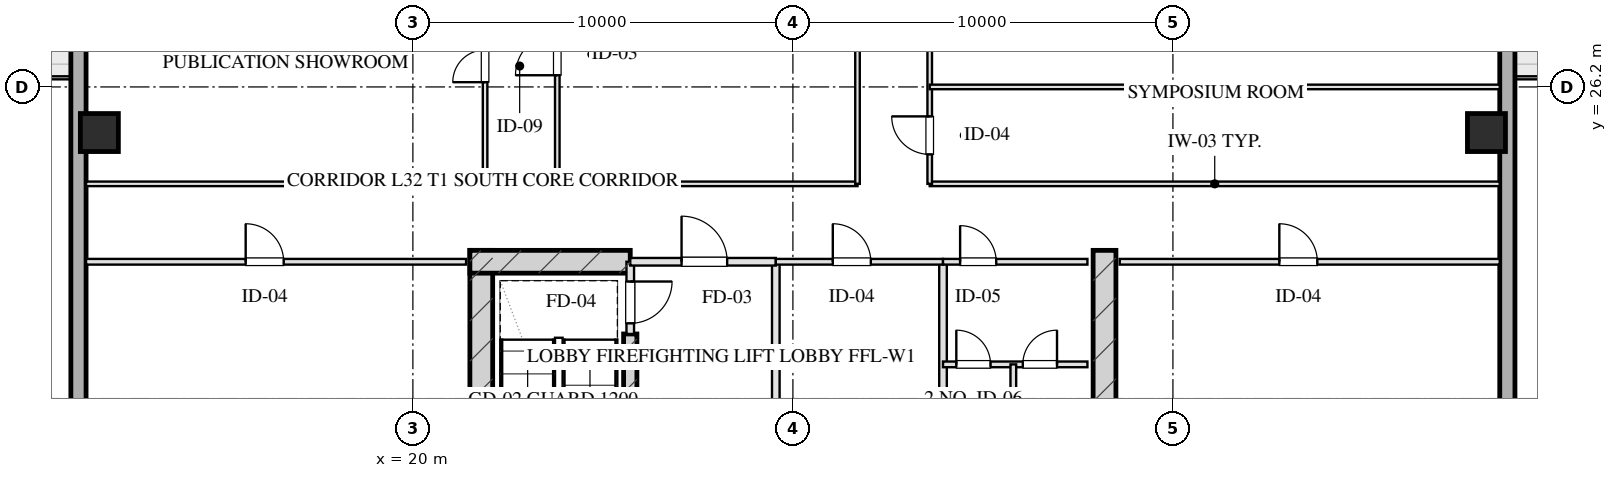
"""IFC4 building model, lengths in metres.
Left out: names, types, materials, properties, quantities, classifications, styles, units other than length and angle.
Written with IfcOpenShell. Run it as: python <this file> out.ifc"""

import sys

from ifc_helpers import new_model, si_unit, direction, frame, frame_2d, origin, origin_2d, place, context, subcontext, project, spatial, rectangle, hollow_rectangle, extrude, element, fill, save


model = new_model("IFC4")
c1 = context("Model", 3, precision=1e-05, world=origin(), true_north=direction((0.0, 1.0)))
c2 = subcontext(c1, "Body", "Model", "MODEL_VIEW")
j1 = project(units=[si_unit("LENGTHUNIT", "METRE"), si_unit("PLANEANGLEUNIT", "RADIAN")], contexts=[c1])
p1 = place(None, origin())
s1 = spatial("IfcSite", under=j1, at=p1, CompositionType="ELEMENT")
p2 = place(p1, origin())
s2 = spatial("IfcBuilding", under=s1, at=p2, CompositionType="ELEMENT")
p3 = place(p2, frame((0.0, 0.0, 124.2)))
s3 = spatial("IfcBuildingStorey", under=s2, at=p3, CompositionType="ELEMENT", Elevation=124.2)
for number, where, z_axis, x_axis in (
    (1, (21.8, 21.9, 0.0), (0.0, 0.0, 1.0), (0.0, -1.0, 0.0)),
    (2, (38.2, 21.9, 0.0), (0.0, 0.0, 1.0), (0.0, -1.0, 0.0)),
):
    element("IfcWall", number, at=place(p3, frame(where, z_axis=z_axis, x_axis=x_axis)), inside=s3, PredefinedType="SHEAR", context=c2, shape_type="SweptSolid", body=[
        extrude(rectangle(XDim=9.48, YDim=0.6, at=frame_2d((4.74, 0.0))), origin(), (0.0, 0.0, 1.0), 3.45),
    ])
p4 = place(p3, frame((25.72, 19.7, 0.0), z_axis=(0.0, 0.0, 1.0), x_axis=(0.0, -1.0, 0.0)))
e3 = element("IfcWall", 3, at=p4, inside=s3, PredefinedType="SHEAR", context=c2, shape_type="SweptSolid", body=[
    extrude(rectangle(XDim=6.98, YDim=0.35, at=frame_2d((3.49, 0.0))), origin(), (0.0, 0.0, 1.0), 3.45),
])
p5 = place(p3, frame((21.5, 21.6, 0.0), z_axis=(0.0, 0.0, 1.0), x_axis=(1.0, 0.0, 0.0)))
e4 = element("IfcWall", 4, at=p5, inside=s3, PredefinedType="SHEAR", context=c2, shape_type="SweptSolid", body=[
    extrude(rectangle(XDim=4.22, YDim=0.6, at=frame_2d((2.11, 0.0))), origin(), (0.0, 0.0, 1.0), 3.45),
])
for number, where, z_axis, x_axis in (
    (5, (11.75, 25.0, 0.0), (0.0, 0.0, 1.0), (1.0, 0.0, 0.0)),
    (6, (48.25, 25.0, 0.0), (0.0, 0.0, 1.0), (1.0, 0.0, 0.0)),
):
    element("IfcColumn", number, at=place(p3, frame(where, z_axis=z_axis, x_axis=x_axis)), inside=s3, PredefinedType="COLUMN", context=c2, shape_type="SweptSolid", body=[
        extrude(hollow_rectangle(XDim=1.0, YDim=1.0, WallThickness=0.036, at=origin_2d()), origin(), (0.0, 0.0, 1.0), 3.451),
    ])
p6 = place(p3, frame((11.2, 9.0, 0.0), z_axis=(0.0, 0.0, 1.0), x_axis=(0.0, 1.0, 0.0)))
e7 = element("IfcWall", 7, at=p6, inside=s3, PredefinedType="SOLIDWALL", context=c2, shape_type="SweptSolid", body=[
    extrude(rectangle(XDim=50.0, YDim=0.4, at=frame_2d((25.0, 0.0))), origin(), (0.0, 0.0, 1.0), 2.61),
])
p7 = place(p6, frame((30.2, 0.0, 0.75)))
e8 = element("IfcOpeningElement", 8, at=p7, cuts=e7, PredefinedType="OPENING", context=c2, shape_type="SweptSolid", body=[
    extrude(rectangle(XDim=2.4, YDim=1.46, at=frame_2d((1.2, 0.73))), frame((0.0, 0.21, 0.0), z_axis=(0.0, -1.0, 0.0), x_axis=(1.0, 0.0, 0.0)), (0.0, 0.0, 1.0), 0.42),
])
p8 = place(p6, frame((18.65, 0.0, 0.0)))
e9 = element("IfcOpeningElement", 9, at=p8, cuts=e7, PredefinedType="OPENING", context=c2, shape_type="SweptSolid", body=[
    extrude(rectangle(XDim=1.1, YDim=2.15, at=frame_2d((0.55, 1.075))), frame((0.0, 0.21, 0.0), z_axis=(0.0, -1.0, 0.0), x_axis=(1.0, 0.0, 0.0)), (0.0, 0.0, 1.0), 0.42),
])
p9 = place(p3, frame((48.8, 59.0, 0.0), z_axis=(0.0, 0.0, 1.0), x_axis=(0.0, -1.0, 0.0)))
e10 = element("IfcWall", 10, at=p9, inside=s3, PredefinedType="SOLIDWALL", context=c2, shape_type="SweptSolid", body=[
    extrude(rectangle(XDim=50.0, YDim=0.4, at=frame_2d((25.0, 0.0))), origin(), (0.0, 0.0, 1.0), 2.61),
])
p10 = place(p9, frame((21.2, 0.0, 0.75)))
e11 = element("IfcOpeningElement", 11, at=p10, cuts=e10, PredefinedType="OPENING", context=c2, shape_type="SweptSolid", body=[
    extrude(rectangle(XDim=2.4, YDim=1.46, at=frame_2d((1.2, 0.73))), frame((0.0, 0.21, 0.0), z_axis=(0.0, -1.0, 0.0), x_axis=(1.0, 0.0, 0.0)), (0.0, 0.0, 1.0), 0.42),
])
p11 = place(p9, frame((30.25, 0.0, 0.0)))
e12 = element("IfcOpeningElement", 12, at=p11, cuts=e10, PredefinedType="OPENING", context=c2, shape_type="SweptSolid", body=[
    extrude(rectangle(XDim=1.1, YDim=2.15, at=frame_2d((0.55, 1.075))), frame((0.0, 0.21, 0.0), z_axis=(0.0, -1.0, 0.0), x_axis=(1.0, 0.0, 0.0)), (0.0, 0.0, 1.0), 0.42),
])
p12 = place(p3, frame((25.72, 21.6, 0.0), z_axis=(0.0, 0.0, 1.0), x_axis=(0.0, -1.0, 0.0)))
e13 = element("IfcWall", 13, at=p12, inside=s3, PredefinedType="PARTITIONING", context=c2, shape_type="SweptSolid", body=[
    extrude(rectangle(XDim=1.9, YDim=0.2, at=frame_2d((0.95, 0.0))), origin(), (0.0, 0.0, 1.0), 3.175),
])
p13 = place(p12, frame((0.52, 0.0, 0.0)))
e14 = element("IfcOpeningElement", 14, at=p13, cuts=e13, PredefinedType="OPENING", context=c2, shape_type="SweptSolid", body=[
    extrude(rectangle(XDim=1.1, YDim=2.05, at=frame_2d((0.55, 1.025))), frame((0.0, 0.11, 0.0), z_axis=(0.0, -1.0, 0.0), x_axis=(1.0, 0.0, 0.0)), (0.0, 0.0, 1.0), 0.22),
])
p14 = place(p3, frame((29.55, 21.6, 0.0), z_axis=(0.0, 0.0, 1.0), x_axis=(0.0, -1.0, 0.0)))
e15 = element("IfcWall", 15, at=p14, inside=s3, PredefinedType="PARTITIONING", context=c2, shape_type="SweptSolid", body=[
    extrude(rectangle(XDim=8.43, YDim=0.2, at=frame_2d((4.215, 0.0))), origin(), (0.0, 0.0, 1.0), 3.175),
])
p15 = place(p3, frame((25.72, 21.6, 0.0), z_axis=(0.0, 0.0, 1.0), x_axis=(1.0, 0.0, 0.0)))
e16 = element("IfcWall", 16, at=p15, inside=s3, PredefinedType="PARTITIONING", context=c2, shape_type="SweptSolid", body=[
    extrude(rectangle(XDim=3.83, YDim=0.2, at=frame_2d((1.915, 0.0))), origin(), (0.0, 0.0, 1.0), 3.175),
])
p16 = place(p15, frame((1.35, 0.0, 0.0)))
e17 = element("IfcOpeningElement", 17, at=p16, cuts=e16, PredefinedType="OPENING", context=c2, shape_type="SweptSolid", body=[
    extrude(rectangle(XDim=1.2, YDim=2.05, at=frame_2d((0.6, 1.025))), frame((0.0, 0.11, 0.0), z_axis=(0.0, -1.0, 0.0), x_axis=(1.0, 0.0, 0.0)), (0.0, 0.0, 1.0), 0.22),
])
p17 = place(p3, frame((33.95, 21.6, 0.0), z_axis=(0.0, 0.0, 1.0), x_axis=(0.0, -1.0, 0.0)))
e18 = element("IfcWall", 18, at=p17, inside=s3, PredefinedType="PARTITIONING", context=c2, shape_type="SweptSolid", body=[
    extrude(rectangle(XDim=8.43, YDim=0.2, at=frame_2d((4.215, 0.0))), origin(), (0.0, 0.0, 1.0), 3.175),
])
p18 = place(p3, frame((29.55, 21.6, 0.0), z_axis=(0.0, 0.0, 1.0), x_axis=(1.0, 0.0, 0.0)))
e19 = element("IfcWall", 19, at=p18, inside=s3, PredefinedType="PARTITIONING", context=c2, shape_type="SweptSolid", body=[
    extrude(rectangle(XDim=4.4, YDim=0.15, at=frame_2d((2.2, 0.0))), origin(), (0.0, 0.0, 1.0), 3.175),
])
p19 = place(p18, frame((1.5, 0.0, 0.0)))
e20 = element("IfcOpeningElement", 20, at=p19, cuts=e19, PredefinedType="OPENING", context=c2, shape_type="SweptSolid", body=[
    extrude(rectangle(XDim=1.0, YDim=2.05, at=frame_2d((0.5, 1.025))), frame((0.0, 0.085, 0.0), z_axis=(0.0, -1.0, 0.0), x_axis=(1.0, 0.0, 0.0)), (0.0, 0.0, 1.0), 0.17),
])
p20 = place(p3, frame((33.95, 21.6, 0.0), z_axis=(0.0, 0.0, 1.0), x_axis=(1.0, 0.0, 0.0)))
e21 = element("IfcWall", 21, at=p20, inside=s3, PredefinedType="PARTITIONING", context=c2, shape_type="SweptSolid", body=[
    extrude(rectangle(XDim=3.8, YDim=0.15, at=frame_2d((1.9, 0.0))), origin(), (0.0, 0.0, 1.0), 3.175),
])
p21 = place(p20, frame((0.45, 0.0, 0.0)))
e22 = element("IfcOpeningElement", 22, at=p21, cuts=e21, PredefinedType="OPENING", context=c2, shape_type="SweptSolid", body=[
    extrude(rectangle(XDim=0.95, YDim=2.05, at=frame_2d((0.475, 1.025))), frame((0.0, 0.085, 0.0), z_axis=(0.0, -1.0, 0.0), x_axis=(1.0, 0.0, 0.0)), (0.0, 0.0, 1.0), 0.17),
])
p22 = place(p3, frame((33.95, 18.9, 0.0), z_axis=(0.0, 0.0, 1.0), x_axis=(1.0, 0.0, 0.0)))
e23 = element("IfcWall", 23, at=p22, inside=s3, PredefinedType="PARTITIONING", context=c2, shape_type="SweptSolid", body=[
    extrude(rectangle(XDim=3.8, YDim=0.15, at=frame_2d((1.9, 0.0))), origin(), (0.0, 0.0, 1.0), 3.175),
])
p23 = place(p22, frame((0.35, 0.0, 0.0)))
e24 = element("IfcOpeningElement", 24, at=p23, cuts=e23, PredefinedType="OPENING", context=c2, shape_type="SweptSolid", body=[
    extrude(rectangle(XDim=0.9, YDim=2.05, at=frame_2d((0.45, 1.025))), frame((0.0, 0.085, 0.0), z_axis=(0.0, -1.0, 0.0), x_axis=(1.0, 0.0, 0.0)), (0.0, 0.0, 1.0), 0.17),
])
p24 = place(p22, frame((2.1, 0.0, 0.0)))
e25 = element("IfcOpeningElement", 25, at=p24, cuts=e23, PredefinedType="OPENING", context=c2, shape_type="SweptSolid", body=[
    extrude(rectangle(XDim=0.9, YDim=2.05, at=frame_2d((0.45, 1.025))), frame((0.0, 0.085, 0.0), z_axis=(0.0, -1.0, 0.0), x_axis=(1.0, 0.0, 0.0)), (0.0, 0.0, 1.0), 0.17),
])
p25 = place(p3, frame((35.8, 18.9, 0.0), z_axis=(0.0, 0.0, 1.0), x_axis=(0.0, -1.0, 0.0)))
e26 = element("IfcWall", 26, at=p25, inside=s3, PredefinedType="PARTITIONING", context=c2, shape_type="SweptSolid", body=[
    extrude(rectangle(XDim=5.73, YDim=0.15, at=frame_2d((2.865, 0.0))), origin(), (0.0, 0.0, 1.0), 3.175),
])
p26 = place(p3, frame((11.4, 21.6, 0.0), z_axis=(0.0, 0.0, 1.0), x_axis=(1.0, 0.0, 0.0)))
e27 = element("IfcWall", 27, at=p26, inside=s3, PredefinedType="PARTITIONING", context=c2, shape_type="SweptSolid", body=[
    extrude(rectangle(XDim=10.0, YDim=0.15, at=frame_2d((5.0, 0.0))), origin(), (0.0, 0.0, 1.0), 3.175),
])
p27 = place(p26, frame((4.2, 0.0, 0.0)))
e28 = element("IfcOpeningElement", 28, at=p27, cuts=e27, PredefinedType="OPENING", context=c2, shape_type="SweptSolid", body=[
    extrude(rectangle(XDim=1.0, YDim=2.05, at=frame_2d((0.5, 1.025))), frame((0.0, 0.085, 0.0), z_axis=(0.0, -1.0, 0.0), x_axis=(1.0, 0.0, 0.0)), (0.0, 0.0, 1.0), 0.17),
])
p28 = place(p3, frame((38.6, 21.6, 0.0), z_axis=(0.0, 0.0, 1.0), x_axis=(1.0, 0.0, 0.0)))
e29 = element("IfcWall", 29, at=p28, inside=s3, PredefinedType="PARTITIONING", context=c2, shape_type="SweptSolid", body=[
    extrude(rectangle(XDim=10.0, YDim=0.15, at=frame_2d((5.0, 0.0))), origin(), (0.0, 0.0, 1.0), 3.175),
])
p29 = place(p28, frame((4.2, 0.0, 0.0)))
e30 = element("IfcOpeningElement", 30, at=p29, cuts=e29, PredefinedType="OPENING", context=c2, shape_type="SweptSolid", body=[
    extrude(rectangle(XDim=1.0, YDim=2.05, at=frame_2d((0.5, 1.025))), frame((0.0, 0.085, 0.0), z_axis=(0.0, -1.0, 0.0), x_axis=(1.0, 0.0, 0.0)), (0.0, 0.0, 1.0), 0.17),
])
p30 = place(p3, frame((11.4, 23.65, 0.0), z_axis=(0.0, 0.0, 1.0), x_axis=(1.0, 0.0, 0.0)))
e31 = element("IfcWall", 31, at=p30, inside=s3, PredefinedType="PARTITIONING", context=c2, shape_type="SweptSolid", body=[
    extrude(rectangle(XDim=10.5, YDim=0.12, at=frame_2d((5.25, 0.0))), origin(), (0.0, 0.0, 1.0), 3.175),
])
p31 = place(p3, frame((23.8, 23.65, 0.0), z_axis=(0.0, 0.0, 1.0), x_axis=(1.0, 0.0, 0.0)))
e32 = element("IfcWall", 32, at=p31, inside=s3, PredefinedType="PARTITIONING", context=c2, shape_type="SweptSolid", body=[
    extrude(rectangle(XDim=7.9, YDim=0.12, at=frame_2d((3.95, 0.0))), origin(), (0.0, 0.0, 1.0), 3.175),
])
p32 = place(p3, frame((33.6, 23.65, 0.0), z_axis=(0.0, 0.0, 1.0), x_axis=(1.0, 0.0, 0.0)))
e33 = element("IfcWall", 33, at=p32, inside=s3, PredefinedType="PARTITIONING", context=c2, shape_type="SweptSolid", body=[
    extrude(rectangle(XDim=15.0, YDim=0.12, at=frame_2d((7.5, 0.0))), origin(), (0.0, 0.0, 1.0), 3.175),
])
p33 = place(p3, frame((21.9, 23.65, 0.0), z_axis=(0.0, 0.0, 1.0), x_axis=(0.0, 1.0, 0.0)))
e34 = element("IfcWall", 34, at=p33, inside=s3, PredefinedType="PARTITIONING", context=c2, shape_type="SweptSolid", body=[
    extrude(rectangle(XDim=20.7, YDim=0.12, at=frame_2d((10.35, 0.0))), origin(), (0.0, 0.0, 1.0), 3.175),
])
p34 = place(p33, frame((2.675, 0.0, 0.0)))
e35 = element("IfcOpeningElement", 35, at=p34, cuts=e34, PredefinedType="OPENING", context=c2, shape_type="SweptSolid", body=[
    extrude(rectangle(XDim=0.85, YDim=2.05, at=frame_2d((0.425, 1.025))), frame((0.0, 0.07, 0.0), z_axis=(0.0, -1.0, 0.0), x_axis=(1.0, 0.0, 0.0)), (0.0, 0.0, 1.0), 0.14),
])
p35 = place(p33, frame((9.85, 0.0, 0.0)))
e36 = element("IfcOpeningElement", 36, at=p35, cuts=e34, PredefinedType="OPENING", context=c2, shape_type="SweptSolid", body=[
    extrude(rectangle(XDim=1.0, YDim=2.05, at=frame_2d((0.5, 1.025))), frame((0.0, 0.07, 0.0), z_axis=(0.0, -1.0, 0.0), x_axis=(1.0, 0.0, 0.0)), (0.0, 0.0, 1.0), 0.14),
])
p36 = place(p33, frame((17.025, 0.0, 0.0)))
e37 = element("IfcOpeningElement", 37, at=p36, cuts=e34, PredefinedType="OPENING", context=c2, shape_type="SweptSolid", body=[
    extrude(rectangle(XDim=1.0, YDim=2.05, at=frame_2d((0.5, 1.025))), frame((0.0, 0.07, 0.0), z_axis=(0.0, -1.0, 0.0), x_axis=(1.0, 0.0, 0.0)), (0.0, 0.0, 1.0), 0.14),
])
p37 = place(p3, frame((23.8, 23.65, 0.0), z_axis=(0.0, 0.0, 1.0), x_axis=(0.0, 1.0, 0.0)))
e38 = element("IfcWall", 38, at=p37, inside=s3, PredefinedType="PARTITIONING", context=c2, shape_type="SweptSolid", body=[
    extrude(rectangle(XDim=20.7, YDim=0.12, at=frame_2d((10.35, 0.0))), origin(), (0.0, 0.0, 1.0), 3.175),
])
p38 = place(p37, frame((2.857, 0.0, 0.0)))
e39 = element("IfcOpeningElement", 39, at=p38, cuts=e38, PredefinedType="OPENING", context=c2, shape_type="SweptSolid", body=[
    extrude(rectangle(XDim=1.1, YDim=2.05, at=frame_2d((0.55, 1.025))), frame((0.0, 0.07, 0.0), z_axis=(0.0, -1.0, 0.0), x_axis=(1.0, 0.0, 0.0)), (0.0, 0.0, 1.0), 0.14),
])
p39 = place(p37, frame((17.189, 0.0, 0.0)))
e40 = element("IfcOpeningElement", 40, at=p39, cuts=e38, PredefinedType="OPENING", context=c2, shape_type="SweptSolid", body=[
    extrude(rectangle(XDim=1.1, YDim=2.05, at=frame_2d((0.55, 1.025))), frame((0.0, 0.07, 0.0), z_axis=(0.0, -1.0, 0.0), x_axis=(1.0, 0.0, 0.0)), (0.0, 0.0, 1.0), 0.14),
])
p40 = place(p3, frame((31.7, 23.65, 0.0), z_axis=(0.0, 0.0, 1.0), x_axis=(0.0, 1.0, 0.0)))
e41 = element("IfcWall", 41, at=p40, inside=s3, PredefinedType="PARTITIONING", context=c2, shape_type="SweptSolid", body=[
    extrude(rectangle(XDim=20.7, YDim=0.12, at=frame_2d((10.35, 0.0))), origin(), (0.0, 0.0, 1.0), 3.175),
])
p41 = place(p40, frame((9.696, 0.0, 0.0)))
e42 = element("IfcOpeningElement", 42, at=p41, cuts=e41, PredefinedType="OPENING", context=c2, shape_type="SweptSolid", body=[
    extrude(rectangle(XDim=1.1, YDim=2.05, at=frame_2d((0.55, 1.025))), frame((0.0, 0.07, 0.0), z_axis=(0.0, -1.0, 0.0), x_axis=(1.0, 0.0, 0.0)), (0.0, 0.0, 1.0), 0.14),
])
p42 = place(p3, frame((33.6, 23.65, 0.0), z_axis=(0.0, 0.0, 1.0), x_axis=(0.0, 1.0, 0.0)))
e43 = element("IfcWall", 43, at=p42, inside=s3, PredefinedType="PARTITIONING", context=c2, shape_type="SweptSolid", body=[
    extrude(rectangle(XDim=20.7, YDim=0.12, at=frame_2d((10.35, 0.0))), origin(), (0.0, 0.0, 1.0), 3.175),
])
p43 = place(p42, frame((0.775, 0.0, 0.0)))
e44 = element("IfcOpeningElement", 44, at=p43, cuts=e43, PredefinedType="OPENING", context=c2, shape_type="SweptSolid", body=[
    extrude(rectangle(XDim=1.0, YDim=2.05, at=frame_2d((0.5, 1.025))), frame((0.0, 0.07, 0.0), z_axis=(0.0, -1.0, 0.0), x_axis=(1.0, 0.0, 0.0)), (0.0, 0.0, 1.0), 0.14),
])
p44 = place(p42, frame((3.95, 0.0, 0.0)))
e45 = element("IfcOpeningElement", 45, at=p44, cuts=e43, PredefinedType="OPENING", context=c2, shape_type="SweptSolid", body=[
    extrude(rectangle(XDim=1.0, YDim=2.05, at=frame_2d((0.5, 1.025))), frame((0.0, 0.07, 0.0), z_axis=(0.0, -1.0, 0.0), x_axis=(1.0, 0.0, 0.0)), (0.0, 0.0, 1.0), 0.14),
])
p45 = place(p42, frame((8.19, 0.0, 0.0)))
e46 = element("IfcOpeningElement", 46, at=p45, cuts=e43, PredefinedType="OPENING", context=c2, shape_type="SweptSolid", body=[
    extrude(rectangle(XDim=1.0, YDim=2.05, at=frame_2d((0.5, 1.025))), frame((0.0, 0.07, 0.0), z_axis=(0.0, -1.0, 0.0), x_axis=(1.0, 0.0, 0.0)), (0.0, 0.0, 1.0), 0.14),
])
p46 = place(p42, frame((12.257, 0.0, 0.0)))
e47 = element("IfcOpeningElement", 47, at=p46, cuts=e43, PredefinedType="OPENING", context=c2, shape_type="SweptSolid", body=[
    extrude(rectangle(XDim=1.0, YDim=2.05, at=frame_2d((0.5, 1.025))), frame((0.0, 0.07, 0.0), z_axis=(0.0, -1.0, 0.0), x_axis=(1.0, 0.0, 0.0)), (0.0, 0.0, 1.0), 0.14),
])
p47 = place(p42, frame((15.816, 0.0, 0.0)))
e48 = element("IfcOpeningElement", 48, at=p47, cuts=e43, PredefinedType="OPENING", context=c2, shape_type="SweptSolid", body=[
    extrude(rectangle(XDim=1.0, YDim=2.05, at=frame_2d((0.5, 1.025))), frame((0.0, 0.07, 0.0), z_axis=(0.0, -1.0, 0.0), x_axis=(1.0, 0.0, 0.0)), (0.0, 0.0, 1.0), 0.14),
])
p48 = place(p42, frame((18.925, 0.0, 0.0)))
e49 = element("IfcOpeningElement", 49, at=p48, cuts=e43, PredefinedType="OPENING", context=c2, shape_type="SweptSolid", body=[
    extrude(rectangle(XDim=0.85, YDim=2.05, at=frame_2d((0.425, 1.025))), frame((0.0, 0.07, 0.0), z_axis=(0.0, -1.0, 0.0), x_axis=(1.0, 0.0, 0.0)), (0.0, 0.0, 1.0), 0.14),
])
p49 = place(p3, frame((33.6, 26.2, 0.0), z_axis=(0.0, 0.0, 1.0), x_axis=(1.0, 0.0, 0.0)))
e50 = element("IfcWall", 50, at=p49, inside=s3, PredefinedType="PARTITIONING", context=c2, shape_type="SweptSolid", body=[
    extrude(rectangle(XDim=15.0, YDim=0.12, at=frame_2d((7.5, 0.0))), origin(), (0.0, 0.0, 1.0), 3.175),
])
p50 = place(p13, origin())
e51 = element("IfcDoor", 51, at=p50, inside=s3, OperationType="SINGLE_SWING_LEFT", PredefinedType="DOOR", context=c2, shape_type="SweptSolid", body=[
    extrude(rectangle(XDim=1.1, YDim=2.05, at=frame_2d((0.55, 1.025))), frame((0.0, 0.025, 0.0), z_axis=(0.0, -1.0, 0.0), x_axis=(1.0, 0.0, 0.0)), (0.0, 0.0, 1.0), 0.05),
])
fill(e14, e51)
p51 = place(p16, origin())
e52 = element("IfcDoor", 52, at=p51, inside=s3, OperationType="SINGLE_SWING_LEFT", PredefinedType="DOOR", context=c2, shape_type="SweptSolid", body=[
    extrude(rectangle(XDim=1.2, YDim=2.05, at=frame_2d((0.6, 1.025))), frame((0.0, 0.025, 0.0), z_axis=(0.0, -1.0, 0.0), x_axis=(1.0, 0.0, 0.0)), (0.0, 0.0, 1.0), 0.05),
])
fill(e17, e52)
p52 = place(p19, origin())
e53 = element("IfcDoor", 53, at=p52, inside=s3, OperationType="SINGLE_SWING_LEFT", PredefinedType="DOOR", context=c2, shape_type="SweptSolid", body=[
    extrude(rectangle(XDim=1.0, YDim=2.05, at=frame_2d((0.5, 1.025))), frame((0.0, 0.025, 0.0), z_axis=(0.0, -1.0, 0.0), x_axis=(1.0, 0.0, 0.0)), (0.0, 0.0, 1.0), 0.05),
])
fill(e20, e53)
p53 = place(p21, origin())
e54 = element("IfcDoor", 54, at=p53, inside=s3, OperationType="SINGLE_SWING_LEFT", PredefinedType="DOOR", context=c2, shape_type="SweptSolid", body=[
    extrude(rectangle(XDim=0.95, YDim=2.05, at=frame_2d((0.475, 1.025))), frame((0.0, 0.025, 0.0), z_axis=(0.0, -1.0, 0.0), x_axis=(1.0, 0.0, 0.0)), (0.0, 0.0, 1.0), 0.05),
])
fill(e22, e54)
p54 = place(p23, origin())
e55 = element("IfcDoor", 55, at=p54, inside=s3, OperationType="SINGLE_SWING_LEFT", PredefinedType="DOOR", context=c2, shape_type="SweptSolid", body=[
    extrude(rectangle(XDim=0.9, YDim=2.05, at=frame_2d((0.45, 1.025))), frame((0.0, 0.025, 0.0), z_axis=(0.0, -1.0, 0.0), x_axis=(1.0, 0.0, 0.0)), (0.0, 0.0, 1.0), 0.05),
])
fill(e24, e55)
p55 = place(p24, origin())
e56 = element("IfcDoor", 56, at=p55, inside=s3, OperationType="SINGLE_SWING_RIGHT", PredefinedType="DOOR", context=c2, shape_type="SweptSolid", body=[
    extrude(rectangle(XDim=0.9, YDim=2.05, at=frame_2d((0.45, 1.025))), frame((0.0, 0.025, 0.0), z_axis=(0.0, -1.0, 0.0), x_axis=(1.0, 0.0, 0.0)), (0.0, 0.0, 1.0), 0.05),
])
fill(e25, e56)
p56 = place(p27, origin())
e57 = element("IfcDoor", 57, at=p56, inside=s3, OperationType="SINGLE_SWING_LEFT", PredefinedType="DOOR", context=c2, shape_type="SweptSolid", body=[
    extrude(rectangle(XDim=1.0, YDim=2.05, at=frame_2d((0.5, 1.025))), frame((0.0, 0.025, 0.0), z_axis=(0.0, -1.0, 0.0), x_axis=(1.0, 0.0, 0.0)), (0.0, 0.0, 1.0), 0.05),
])
fill(e28, e57)
p57 = place(p29, origin())
e58 = element("IfcDoor", 58, at=p57, inside=s3, OperationType="SINGLE_SWING_LEFT", PredefinedType="DOOR", context=c2, shape_type="SweptSolid", body=[
    extrude(rectangle(XDim=1.0, YDim=2.05, at=frame_2d((0.5, 1.025))), frame((0.0, 0.025, 0.0), z_axis=(0.0, -1.0, 0.0), x_axis=(1.0, 0.0, 0.0)), (0.0, 0.0, 1.0), 0.05),
])
fill(e30, e58)
p58 = place(p34, origin())
e59 = element("IfcDoor", 59, at=p58, inside=s3, OperationType="SINGLE_SWING_LEFT", PredefinedType="DOOR", context=c2, shape_type="SweptSolid", body=[
    extrude(rectangle(XDim=0.85, YDim=2.05, at=frame_2d((0.425, 1.025))), frame((0.0, 0.025, 0.0), z_axis=(0.0, -1.0, 0.0), x_axis=(1.0, 0.0, 0.0)), (0.0, 0.0, 1.0), 0.05),
])
fill(e35, e59)
p59 = place(p38, origin())
e60 = element("IfcDoor", 60, at=p59, inside=s3, OperationType="SINGLE_SWING_LEFT", PredefinedType="DOOR", context=c2, shape_type="SweptSolid", body=[
    extrude(rectangle(XDim=1.1, YDim=2.05, at=frame_2d((0.55, 1.025))), frame((0.0, 0.025, 0.0), z_axis=(0.0, -1.0, 0.0), x_axis=(1.0, 0.0, 0.0)), (0.0, 0.0, 1.0), 0.05),
])
fill(e39, e60)
p60 = place(p43, origin())
e61 = element("IfcDoor", 61, at=p60, inside=s3, OperationType="SINGLE_SWING_RIGHT", PredefinedType="DOOR", context=c2, shape_type="SweptSolid", body=[
    extrude(rectangle(XDim=1.0, YDim=2.05, at=frame_2d((0.5, 1.025))), frame((0.0, 0.025, 0.0), z_axis=(0.0, -1.0, 0.0), x_axis=(1.0, 0.0, 0.0)), (0.0, 0.0, 1.0), 0.05),
])
fill(e44, e61)
save(model, sys.argv[1])
